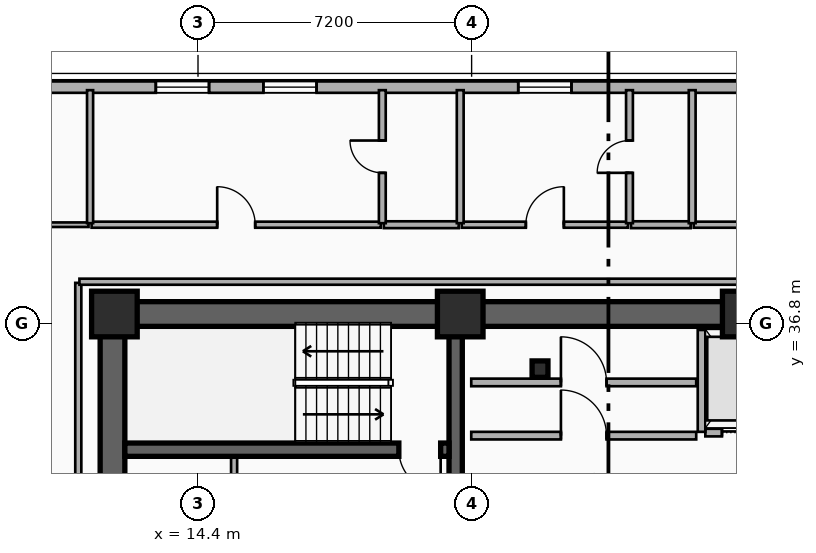
"""IFC4 building model, lengths in metres.
Left out: names, types, materials, properties, quantities, classifications, styles, units other than length and angle.
Written with IfcOpenShell. Run it as: python <this file> out.ifc"""

import sys

from ifc_helpers import new_model, si_unit, direction, frame, frame_2d, origin, origin_2d, place, context, subcontext, project, spatial, rectangle, i_section, extrude, element, fill, save


model = new_model("IFC4")
c1 = context("Model", 3, precision=1e-05, world=origin(), true_north=direction((0.0, 1.0)))
c2 = subcontext(c1, "Body", "Model", "MODEL_VIEW")
j1 = project(units=[si_unit("LENGTHUNIT", "METRE"), si_unit("PLANEANGLEUNIT", "RADIAN")], contexts=[c1])
p1 = place(None, origin())
s1 = spatial("IfcSite", under=j1, at=p1, CompositionType="ELEMENT")
p2 = place(p1, origin())
s2 = spatial("IfcBuilding", under=s1, at=p2, CompositionType="ELEMENT")
p3 = place(p2, frame((0.0, 0.0, 115.3)))
s3 = spatial("IfcBuildingStorey", under=s2, at=p3, CompositionType="ELEMENT", Elevation=115.3)
p4 = place(p3, frame((12.15, 37.05, 0.0), z_axis=(0.0, 0.0, 1.0), x_axis=(1.0, 0.0, 0.0)))
e1 = element("IfcWall", 1, at=p4, inside=s3, PredefinedType="SHEAR", context=c2, shape_type="SweptSolid", body=[
    extrude(rectangle(XDim=33.23, YDim=0.65, at=frame_2d((16.615, 0.0))), origin(), (0.0, 0.0, 1.0), 3.5),
])
p5 = place(p3, frame((12.15, 28.145, 0.0), z_axis=(0.0, 0.0, 1.0), x_axis=(0.0, 1.0, 0.0)))
e2 = element("IfcWall", 2, at=p5, inside=s3, PredefinedType="SHEAR", context=c2, shape_type="SweptSolid", body=[
    extrude(rectangle(XDim=8.58, YDim=0.65, at=frame_2d((4.29, 0.0))), origin(), (0.0, 0.0, 1.0), 3.5),
])
p6 = place(p3, frame((21.18, 28.145, 0.0), z_axis=(0.0, 0.0, 1.0), x_axis=(0.0, 1.0, 0.0)))
e3 = element("IfcWall", 3, at=p6, inside=s3, PredefinedType="SHEAR", context=c2, shape_type="SweptSolid", body=[
    extrude(rectangle(XDim=8.58, YDim=0.35, at=frame_2d((4.29, 0.0))), origin(), (0.0, 0.0, 1.0), 3.5),
])
p7 = place(p3, frame((21.005, 33.48, 0.0), z_axis=(0.0, 0.0, 1.0), x_axis=(-1.0, 0.0, 0.0)))
e4 = element("IfcWall", 4, at=p7, inside=s3, PredefinedType="SHEAR", context=c2, shape_type="SweptSolid", body=[
    extrude(rectangle(XDim=8.53, YDim=0.35, at=frame_2d((4.265, 0.0))), origin(), (0.0, 0.0, 1.0), 3.5),
])
p8 = place(p7, frame((0.22, 0.0, 0.0)))
e5 = element("IfcOpeningElement", 5, at=p8, cuts=e4, PredefinedType="OPENING", context=c2, shape_type="SweptSolid", body=[
    extrude(rectangle(XDim=1.1, YDim=2.15, at=frame_2d((0.55, 1.075))), frame((0.0, 0.185, 0.0), z_axis=(0.0, -1.0, 0.0), x_axis=(1.0, 0.0, 0.0)), (0.0, 0.0, 1.0), 0.37),
])
p9 = place(p3, frame((23.4, 35.6, 0.0), z_axis=(0.0, 0.0, 1.0), x_axis=(1.0, 0.0, 0.0)))
e6 = element("IfcColumn", 6, at=p9, inside=s3, PredefinedType="COLUMN", context=c2, shape_type="SweptSolid", body=[
    extrude(i_section(OverallWidth=0.418, OverallDepth=0.432, WebThickness=0.035, FlangeThickness=0.056, FilletRadius=0.015, at=origin_2d()), origin(), (0.0, 0.0, 1.0), 3.5),
])
for number, where, z_axis, x_axis in (
    (7, (12.2, 37.05, 0.0), (0.0, 0.0, 1.0), (1.0, 0.0, 0.0)),
    (8, (21.3, 37.05, 0.0), (0.0, 0.0, 1.0), (1.0, 0.0, 0.0)),
    (9, (28.8, 37.05, 0.0), (0.0, 0.0, 1.0), (1.0, 0.0, 0.0)),
):
    element("IfcColumn", number, at=place(p3, frame(where, z_axis=z_axis, x_axis=x_axis)), inside=s3, PredefinedType="COLUMN", context=c2, shape_type="SweptSolid", body=[
        extrude(rectangle(XDim=1.2, YDim=1.2, at=origin_2d()), origin(), (0.0, 0.0, 1.0), 3.5),
    ])
p10 = place(p3, frame((4.2, 43.02, 0.0), z_axis=(0.0, 0.0, 1.0), x_axis=(1.0, 0.0, 0.0)))
e10 = element("IfcWall", 10, at=p10, inside=s3, PredefinedType="SOLIDWALL", context=c2, shape_type="SweptSolid", body=[
    extrude(rectangle(XDim=49.2, YDim=0.3, at=frame_2d((24.6, 0.0))), origin(), (0.0, 0.0, 1.0), 3.24),
])
p11 = place(p10, frame((9.09, 0.0, 0.85)))
e11 = element("IfcOpeningElement", 11, at=p11, cuts=e10, PredefinedType="OPENING", context=c2, shape_type="SweptSolid", body=[
    extrude(rectangle(XDim=1.4, YDim=1.8, at=frame_2d((0.7, 0.9))), frame((0.0, 0.16, 0.0), z_axis=(0.0, -1.0, 0.0), x_axis=(1.0, 0.0, 0.0)), (0.0, 0.0, 1.0), 0.32),
])
p12 = place(p10, frame((11.92, 0.0, 0.85)))
e12 = element("IfcOpeningElement", 12, at=p12, cuts=e10, PredefinedType="OPENING", context=c2, shape_type="SweptSolid", body=[
    extrude(rectangle(XDim=1.4, YDim=1.8, at=frame_2d((0.7, 0.9))), frame((0.0, 0.16, 0.0), z_axis=(0.0, -1.0, 0.0), x_axis=(1.0, 0.0, 0.0)), (0.0, 0.0, 1.0), 0.32),
])
p13 = place(p10, frame((18.627, 0.0, 0.85)))
e13 = element("IfcOpeningElement", 13, at=p13, cuts=e10, PredefinedType="OPENING", context=c2, shape_type="SweptSolid", body=[
    extrude(rectangle(XDim=1.4, YDim=1.8, at=frame_2d((0.7, 0.9))), frame((0.0, 0.16, 0.0), z_axis=(0.0, -1.0, 0.0), x_axis=(1.0, 0.0, 0.0)), (0.0, 0.0, 1.0), 0.32),
])
p14 = place(p10, frame((24.669, 0.0, 0.85)))
e14 = element("IfcOpeningElement", 14, at=p14, cuts=e10, PredefinedType="OPENING", context=c2, shape_type="SweptSolid", body=[
    extrude(rectangle(XDim=1.4, YDim=1.8, at=frame_2d((0.7, 0.9))), frame((0.0, 0.16, 0.0), z_axis=(0.0, -1.0, 0.0), x_axis=(1.0, 0.0, 0.0)), (0.0, 0.0, 1.0), 0.32),
])
p15 = place(p10, frame((27.235, 0.0, 0.85)))
e15 = element("IfcOpeningElement", 15, at=p15, cuts=e10, PredefinedType="OPENING", context=c2, shape_type="SweptSolid", body=[
    extrude(rectangle(XDim=1.4, YDim=1.8, at=frame_2d((0.7, 0.9))), frame((0.0, 0.16, 0.0), z_axis=(0.0, -1.0, 0.0), x_axis=(1.0, 0.0, 0.0)), (0.0, 0.0, 1.0), 0.32),
])
p16 = place(p10, frame((33.65, 0.0, 0.85)))
e16 = element("IfcOpeningElement", 16, at=p16, cuts=e10, PredefinedType="OPENING", context=c2, shape_type="SweptSolid", body=[
    extrude(rectangle(XDim=1.4, YDim=1.8, at=frame_2d((0.7, 0.9))), frame((0.0, 0.16, 0.0), z_axis=(0.0, -1.0, 0.0), x_axis=(1.0, 0.0, 0.0)), (0.0, 0.0, 1.0), 0.32),
])
p17 = place(p10, frame((36.25, 0.0, 0.85)))
e17 = element("IfcOpeningElement", 17, at=p17, cuts=e10, PredefinedType="OPENING", context=c2, shape_type="SweptSolid", body=[
    extrude(rectangle(XDim=1.4, YDim=1.8, at=frame_2d((0.7, 0.9))), frame((0.0, 0.16, 0.0), z_axis=(0.0, -1.0, 0.0), x_axis=(1.0, 0.0, 0.0)), (0.0, 0.0, 1.0), 0.32),
])
p18 = place(p10, frame((44.377, 0.0, 0.85)))
e18 = element("IfcOpeningElement", 18, at=p18, cuts=e10, PredefinedType="OPENING", context=c2, shape_type="SweptSolid", body=[
    extrude(rectangle(XDim=1.4, YDim=1.8, at=frame_2d((0.7, 0.9))), frame((0.0, 0.16, 0.0), z_axis=(0.0, -1.0, 0.0), x_axis=(1.0, 0.0, 0.0)), (0.0, 0.0, 1.0), 0.32),
])
p19 = place(p3, frame((27.75, 33.93, 0.0), z_axis=(0.0, 0.0, 1.0), x_axis=(1.0, 0.0, 0.0)))
e19 = element("IfcWall", 19, at=p19, inside=s3, PredefinedType="PARTITIONING", context=c2, shape_type="SweptSolid", body=[
    extrude(rectangle(XDim=1.975, YDim=0.2, at=frame_2d((0.988, 0.0))), origin(), (0.0, 0.0, 1.0), 2.212),
])
p20 = place(p19, frame((0.438, 0.0, 0.0)))
e20 = element("IfcOpeningElement", 20, at=p20, cuts=e19, PredefinedType="OPENING", context=c2, shape_type="SweptSolid", body=[
    extrude(rectangle(XDim=1.1, YDim=2.15, at=frame_2d((0.55, 1.075))), frame((0.0, 0.11, 0.0), z_axis=(0.0, -1.0, 0.0), x_axis=(1.0, 0.0, 0.0)), (0.0, 0.0, 1.0), 0.22),
])
p21 = place(p3, frame((27.65, 33.95, 0.0), z_axis=(0.0, 0.0, 1.0), x_axis=(0.0, 1.0, 0.0)))
e21 = element("IfcWall", 21, at=p21, inside=s3, PredefinedType="PARTITIONING", context=c2, shape_type="SweptSolid", body=[
    extrude(rectangle(XDim=2.68, YDim=0.2, at=frame_2d((1.34, 0.0))), origin(), (0.0, 0.0, 1.0), 2.212),
])
p22 = place(p3, frame((21.59, 33.85, 0.0), z_axis=(0.0, 0.0, 1.0), x_axis=(1.0, 0.0, 0.0)))
e22 = element("IfcWall", 22, at=p22, inside=s3, PredefinedType="PARTITIONING", context=c2, shape_type="SweptSolid", body=[
    extrude(rectangle(XDim=5.92, YDim=0.2, at=frame_2d((2.96, 0.0))), origin(), (0.0, 0.0, 1.0), 2.28),
])
p23 = place(p22, frame((2.36, 0.0, 0.0)))
e23 = element("IfcOpeningElement", 23, at=p23, cuts=e22, PredefinedType="OPENING", context=c2, shape_type="SweptSolid", body=[
    extrude(rectangle(XDim=1.2, YDim=2.15, at=frame_2d((0.6, 1.075))), frame((0.0, 0.11, 0.0), z_axis=(0.0, -1.0, 0.0), x_axis=(1.0, 0.0, 0.0)), (0.0, 0.0, 1.0), 0.22),
])
p24 = place(p3, frame((21.59, 35.25, 0.0), z_axis=(0.0, 0.0, 1.0), x_axis=(1.0, 0.0, 0.0)))
e24 = element("IfcWall", 24, at=p24, inside=s3, PredefinedType="PARTITIONING", context=c2, shape_type="SweptSolid", body=[
    extrude(rectangle(XDim=5.92, YDim=0.2, at=frame_2d((2.96, 0.0))), origin(), (0.0, 0.0, 1.0), 2.28),
])
p25 = place(p24, frame((2.36, 0.0, 0.0)))
e25 = element("IfcOpeningElement", 25, at=p25, cuts=e24, PredefinedType="OPENING", context=c2, shape_type="SweptSolid", body=[
    extrude(rectangle(XDim=1.2, YDim=2.15, at=frame_2d((0.6, 1.075))), frame((0.0, 0.11, 0.0), z_axis=(0.0, -1.0, 0.0), x_axis=(1.0, 0.0, 0.0)), (0.0, 0.0, 1.0), 0.22),
])
p26 = place(p3, frame((0.26, 39.4, 0.0), z_axis=(0.0, 0.0, 1.0), x_axis=(1.0, 0.0, 0.0)))
e26 = element("IfcWall", 26, at=p26, inside=s3, PredefinedType="PARTITIONING", context=c2, shape_type="SweptSolid", body=[
    extrude(rectangle(XDim=11.26, YDim=0.12, at=frame_2d((5.63, 0.0))), origin(), (0.0, 0.0, 1.0), 3.24),
])
p27 = place(p26, frame((5.18, 0.0, 0.0)))
e27 = element("IfcOpeningElement", 27, at=p27, cuts=e26, PredefinedType="OPENING", context=c2, shape_type="SweptSolid", body=[
    extrude(rectangle(XDim=0.9, YDim=2.1, at=frame_2d((0.45, 1.05))), frame((0.0, 0.07, 0.0), z_axis=(0.0, -1.0, 0.0), x_axis=(1.0, 0.0, 0.0)), (0.0, 0.0, 1.0), 0.14),
])
p28 = place(p3, frame((11.6, 39.4, 0.0), z_axis=(0.0, 0.0, 1.0), x_axis=(1.0, 0.0, 0.0)))
e28 = element("IfcWall", 28, at=p28, inside=s3, PredefinedType="PARTITIONING", context=c2, shape_type="SweptSolid", body=[
    extrude(rectangle(XDim=7.61, YDim=0.16, at=frame_2d((3.805, 0.0))), origin(), (0.0, 0.0, 1.0), 3.24),
])
p29 = place(p28, frame((3.305, 0.0, 0.0)))
e29 = element("IfcOpeningElement", 29, at=p29, cuts=e28, PredefinedType="OPENING", context=c2, shape_type="SweptSolid", body=[
    extrude(rectangle(XDim=1.0, YDim=2.15, at=frame_2d((0.5, 1.075))), frame((0.0, 0.09, 0.0), z_axis=(0.0, -1.0, 0.0), x_axis=(1.0, 0.0, 0.0)), (0.0, 0.0, 1.0), 0.18),
])
p30 = place(p3, frame((19.29, 39.4, 0.0), z_axis=(0.0, 0.0, 1.0), x_axis=(1.0, 0.0, 0.0)))
e30 = element("IfcWall", 30, at=p30, inside=s3, PredefinedType="PLUMBINGWALL", context=c2, shape_type="SweptSolid", body=[
    extrude(rectangle(XDim=1.97, YDim=0.18, at=frame_2d((0.985, 0.0))), origin(), (0.0, 0.0, 1.0), 3.24),
])
p31 = place(p3, frame((21.34, 39.4, 0.0), z_axis=(0.0, 0.0, 1.0), x_axis=(1.0, 0.0, 0.0)))
e31 = element("IfcWall", 31, at=p31, inside=s3, PredefinedType="PARTITIONING", context=c2, shape_type="SweptSolid", body=[
    extrude(rectangle(XDim=4.374, YDim=0.16, at=frame_2d((2.187, 0.0))), origin(), (0.0, 0.0, 1.0), 3.24),
])
p32 = place(p31, frame((1.687, 0.0, 0.0)))
e32 = element("IfcOpeningElement", 32, at=p32, cuts=e31, PredefinedType="OPENING", context=c2, shape_type="SweptSolid", body=[
    extrude(rectangle(XDim=1.0, YDim=2.15, at=frame_2d((0.5, 1.075))), frame((0.0, 0.09, 0.0), z_axis=(0.0, -1.0, 0.0), x_axis=(1.0, 0.0, 0.0)), (0.0, 0.0, 1.0), 0.18),
])
p33 = place(p3, frame((25.794, 39.4, 0.0), z_axis=(0.0, 0.0, 1.0), x_axis=(1.0, 0.0, 0.0)))
e33 = element("IfcWall", 33, at=p33, inside=s3, PredefinedType="PLUMBINGWALL", context=c2, shape_type="SweptSolid", body=[
    extrude(rectangle(XDim=1.57, YDim=0.18, at=frame_2d((0.785, 0.0))), origin(), (0.0, 0.0, 1.0), 3.24),
])
p34 = place(p3, frame((27.444, 39.4, 0.0), z_axis=(0.0, 0.0, 1.0), x_axis=(1.0, 0.0, 0.0)))
e34 = element("IfcWall", 34, at=p34, inside=s3, PredefinedType="PARTITIONING", context=c2, shape_type="SweptSolid", body=[
    extrude(rectangle(XDim=6.816, YDim=0.16, at=frame_2d((3.408, 0.0))), origin(), (0.0, 0.0, 1.0), 3.24),
])
p35 = place(p34, frame((2.908, 0.0, 0.0)))
e35 = element("IfcOpeningElement", 35, at=p35, cuts=e34, PredefinedType="OPENING", context=c2, shape_type="SweptSolid", body=[
    extrude(rectangle(XDim=1.0, YDim=2.15, at=frame_2d((0.5, 1.075))), frame((0.0, 0.09, 0.0), z_axis=(0.0, -1.0, 0.0), x_axis=(1.0, 0.0, 0.0)), (0.0, 0.0, 1.0), 0.18),
])
p36 = place(p3, frame((11.56, 39.44, 0.0), z_axis=(0.0, 0.0, 1.0), x_axis=(0.0, 1.0, 0.0)))
e36 = element("IfcWall", 36, at=p36, inside=s3, PredefinedType="PARTITIONING", context=c2, shape_type="SweptSolid", body=[
    extrude(rectangle(XDim=3.5, YDim=0.16, at=frame_2d((1.75, 0.0))), origin(), (0.0, 0.0, 1.0), 3.24),
])
p37 = place(p3, frame((19.25, 39.44, 0.0), z_axis=(0.0, 0.0, 1.0), x_axis=(0.0, 1.0, 0.0)))
e37 = element("IfcWall", 37, at=p37, inside=s3, PredefinedType="PLUMBINGWALL", context=c2, shape_type="SweptSolid", body=[
    extrude(rectangle(XDim=3.5, YDim=0.18, at=frame_2d((1.75, 0.0))), origin(), (0.0, 0.0, 1.0), 3.24),
])
p38 = place(p37, frame((1.325, 0.0, 0.0)))
e38 = element("IfcOpeningElement", 38, at=p38, cuts=e37, PredefinedType="OPENING", context=c2, shape_type="SweptSolid", body=[
    extrude(rectangle(XDim=0.85, YDim=2.1, at=frame_2d((0.425, 1.05))), frame((0.0, 0.1, 0.0), z_axis=(0.0, -1.0, 0.0), x_axis=(1.0, 0.0, 0.0)), (0.0, 0.0, 1.0), 0.2),
])
p39 = place(p3, frame((21.3, 39.44, 0.0), z_axis=(0.0, 0.0, 1.0), x_axis=(0.0, 1.0, 0.0)))
e39 = element("IfcWall", 39, at=p39, inside=s3, PredefinedType="PLUMBINGWALL", context=c2, shape_type="SweptSolid", body=[
    extrude(rectangle(XDim=3.5, YDim=0.18, at=frame_2d((1.75, 0.0))), origin(), (0.0, 0.0, 1.0), 3.24),
])
p40 = place(p3, frame((25.754, 39.44, 0.0), z_axis=(0.0, 0.0, 1.0), x_axis=(0.0, 1.0, 0.0)))
e40 = element("IfcWall", 40, at=p40, inside=s3, PredefinedType="PLUMBINGWALL", context=c2, shape_type="SweptSolid", body=[
    extrude(rectangle(XDim=3.5, YDim=0.18, at=frame_2d((1.75, 0.0))), origin(), (0.0, 0.0, 1.0), 3.24),
])
p41 = place(p40, frame((1.325, 0.0, 0.0)))
e41 = element("IfcOpeningElement", 41, at=p41, cuts=e40, PredefinedType="OPENING", context=c2, shape_type="SweptSolid", body=[
    extrude(rectangle(XDim=0.85, YDim=2.1, at=frame_2d((0.425, 1.05))), frame((0.0, 0.1, 0.0), z_axis=(0.0, -1.0, 0.0), x_axis=(1.0, 0.0, 0.0)), (0.0, 0.0, 1.0), 0.2),
])
p42 = place(p3, frame((27.404, 39.44, 0.0), z_axis=(0.0, 0.0, 1.0), x_axis=(0.0, 1.0, 0.0)))
e42 = element("IfcWall", 42, at=p42, inside=s3, PredefinedType="PLUMBINGWALL", context=c2, shape_type="SweptSolid", body=[
    extrude(rectangle(XDim=3.5, YDim=0.18, at=frame_2d((1.75, 0.0))), origin(), (0.0, 0.0, 1.0), 3.24),
])
p43 = place(p3, frame((15.35, 30.96, 0.0), z_axis=(0.0, 0.0, 1.0), x_axis=(0.0, 1.0, 0.0)))
e43 = element("IfcWall", 43, at=p43, inside=s3, PredefinedType="PARTITIONING", context=c2, shape_type="SweptSolid", body=[
    extrude(rectangle(XDim=2.31, YDim=0.16, at=frame_2d((1.155, 0.0))), origin(), (0.0, 0.0, 1.0), 3.24),
])
p44 = place(p3, frame((11.25, 27.63, 0.0), z_axis=(0.0, 0.0, 1.0), x_axis=(0.0, 1.0, 0.0)))
e44 = element("IfcWall", 44, at=p44, inside=s3, PredefinedType="PARTITIONING", context=c2, shape_type="SweptSolid", body=[
    extrude(rectangle(XDim=10.24, YDim=0.16, at=frame_2d((5.12, 0.0))), origin(), (0.0, 0.0, 1.0), 2.72),
])
p45 = place(p3, frame((11.28, 37.9, 0.0), z_axis=(0.0, 0.0, 1.0), x_axis=(1.0, 0.0, 0.0)))
e45 = element("IfcWall", 45, at=p45, inside=s3, PredefinedType="PARTITIONING", context=c2, shape_type="SweptSolid", body=[
    extrude(rectangle(XDim=35.04, YDim=0.16, at=frame_2d((17.52, 0.0))), origin(), (0.0, 0.0, 1.0), 3.24),
])
p46 = place(p11, origin())
e46 = element("IfcWindow", 46, at=p46, inside=s3, PartitioningType="SINGLE_PANEL", PredefinedType="WINDOW", context=c2, shape_type="SweptSolid", body=[
    extrude(rectangle(XDim=1.4, YDim=1.8, at=frame_2d((0.7, 0.9))), frame((0.0, 0.03, 0.0), z_axis=(0.0, -1.0, 0.0), x_axis=(1.0, 0.0, 0.0)), (0.0, 0.0, 1.0), 0.06),
])
fill(e11, e46)
p47 = place(p12, origin())
e47 = element("IfcWindow", 47, at=p47, inside=s3, PartitioningType="SINGLE_PANEL", PredefinedType="WINDOW", context=c2, shape_type="SweptSolid", body=[
    extrude(rectangle(XDim=1.4, YDim=1.8, at=frame_2d((0.7, 0.9))), frame((0.0, 0.03, 0.0), z_axis=(0.0, -1.0, 0.0), x_axis=(1.0, 0.0, 0.0)), (0.0, 0.0, 1.0), 0.06),
])
fill(e12, e47)
p48 = place(p13, origin())
e48 = element("IfcWindow", 48, at=p48, inside=s3, PartitioningType="SINGLE_PANEL", PredefinedType="WINDOW", context=c2, shape_type="SweptSolid", body=[
    extrude(rectangle(XDim=1.4, YDim=1.8, at=frame_2d((0.7, 0.9))), frame((0.0, 0.03, 0.0), z_axis=(0.0, -1.0, 0.0), x_axis=(1.0, 0.0, 0.0)), (0.0, 0.0, 1.0), 0.06),
])
fill(e13, e48)
p49 = place(p20, origin())
e49 = element("IfcDoor", 49, at=p49, inside=s3, OperationType="DOUBLE_DOOR_SLIDING", PredefinedType="DOOR", context=c2, shape_type="SweptSolid", body=[
    extrude(rectangle(XDim=1.1, YDim=2.15, at=frame_2d((0.55, 1.075))), frame((0.0, 0.025, 0.0), z_axis=(0.0, -1.0, 0.0), x_axis=(1.0, 0.0, 0.0)), (0.0, 0.0, 1.0), 0.05),
])
fill(e20, e49)
p50 = place(p8, origin())
e50 = element("IfcDoor", 50, at=p50, inside=s3, OperationType="SINGLE_SWING_LEFT", PredefinedType="DOOR", context=c2, shape_type="SweptSolid", body=[
    extrude(rectangle(XDim=1.1, YDim=2.15, at=frame_2d((0.55, 1.075))), frame((0.0, 0.025, 0.0), z_axis=(0.0, -1.0, 0.0), x_axis=(1.0, 0.0, 0.0)), (0.0, 0.0, 1.0), 0.05),
])
fill(e5, e50)
p51 = place(p23, origin())
e51 = element("IfcDoor", 51, at=p51, inside=s3, OperationType="SINGLE_SWING_LEFT", PredefinedType="DOOR", context=c2, shape_type="SweptSolid", body=[
    extrude(rectangle(XDim=1.2, YDim=2.15, at=frame_2d((0.6, 1.075))), frame((0.0, 0.025, 0.0), z_axis=(0.0, -1.0, 0.0), x_axis=(1.0, 0.0, 0.0)), (0.0, 0.0, 1.0), 0.05),
])
fill(e23, e51)
p52 = place(p25, origin())
e52 = element("IfcDoor", 52, at=p52, inside=s3, OperationType="SINGLE_SWING_LEFT", PredefinedType="DOOR", context=c2, shape_type="SweptSolid", body=[
    extrude(rectangle(XDim=1.2, YDim=2.15, at=frame_2d((0.6, 1.075))), frame((0.0, 0.025, 0.0), z_axis=(0.0, -1.0, 0.0), x_axis=(1.0, 0.0, 0.0)), (0.0, 0.0, 1.0), 0.05),
])
fill(e25, e52)
p53 = place(p29, origin())
e53 = element("IfcDoor", 53, at=p53, inside=s3, OperationType="SINGLE_SWING_LEFT", PredefinedType="DOOR", context=c2, shape_type="SweptSolid", body=[
    extrude(rectangle(XDim=1.0, YDim=2.15, at=frame_2d((0.5, 1.075))), frame((0.0, 0.025, 0.0), z_axis=(0.0, -1.0, 0.0), x_axis=(1.0, 0.0, 0.0)), (0.0, 0.0, 1.0), 0.05),
])
fill(e29, e53)
p54 = place(p32, origin())
e54 = element("IfcDoor", 54, at=p54, inside=s3, OperationType="SINGLE_SWING_RIGHT", PredefinedType="DOOR", context=c2, shape_type="SweptSolid", body=[
    extrude(rectangle(XDim=1.0, YDim=2.15, at=frame_2d((0.5, 1.075))), frame((0.0, 0.025, 0.0), z_axis=(0.0, -1.0, 0.0), x_axis=(1.0, 0.0, 0.0)), (0.0, 0.0, 1.0), 0.05),
])
fill(e32, e54)
p55 = place(p38, origin())
e55 = element("IfcDoor", 55, at=p55, inside=s3, OperationType="SINGLE_SWING_RIGHT", PredefinedType="DOOR", context=c2, shape_type="SweptSolid", body=[
    extrude(rectangle(XDim=0.85, YDim=2.1, at=frame_2d((0.425, 1.05))), frame((0.0, 0.025, 0.0), z_axis=(0.0, -1.0, 0.0), x_axis=(1.0, 0.0, 0.0)), (0.0, 0.0, 1.0), 0.05),
])
fill(e38, e55)
p56 = place(p41, origin())
e56 = element("IfcDoor", 56, at=p56, inside=s3, OperationType="SINGLE_SWING_LEFT", PredefinedType="DOOR", context=c2, shape_type="SweptSolid", body=[
    extrude(rectangle(XDim=0.85, YDim=2.1, at=frame_2d((0.425, 1.05))), frame((0.0, 0.025, 0.0), z_axis=(0.0, -1.0, 0.0), x_axis=(1.0, 0.0, 0.0)), (0.0, 0.0, 1.0), 0.05),
])
fill(e41, e56)
save(model, sys.argv[1])
